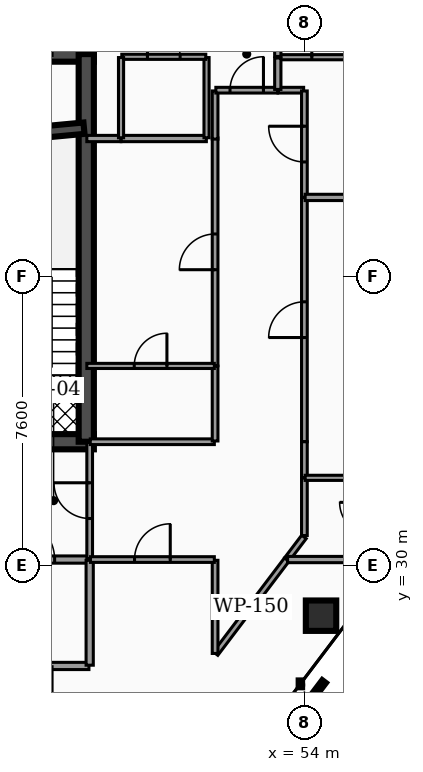
"""IFC4 building model, lengths in metres.
Left out: names, types, materials, properties, quantities, classifications, styles, units other than length and angle.
Written with IfcOpenShell. Run it as: python <this file> out.ifc"""

import sys

from ifc_helpers import new_model, si_unit, direction, frame, frame_2d, origin, origin_2d, place, context, subcontext, project, spatial, rectangle, hollow_rectangle, extrude, element, fill, save


model = new_model("IFC4")
c1 = context("Model", 3, precision=1e-05, world=origin(), true_north=direction((0.0, 1.0)))
c2 = subcontext(c1, "Body", "Model", "MODEL_VIEW")
j1 = project(units=[si_unit("LENGTHUNIT", "METRE"), si_unit("PLANEANGLEUNIT", "RADIAN")], contexts=[c1])
p1 = place(None, origin())
s1 = spatial("IfcSite", under=j1, at=p1, CompositionType="ELEMENT")
p2 = place(p1, origin())
s2 = spatial("IfcBuilding", under=s1, at=p2, CompositionType="ELEMENT")
p3 = place(p2, frame((0.0, 0.0, 127.16)))
s3 = spatial("IfcBuildingStorey", under=s2, at=p3, CompositionType="ELEMENT", Elevation=127.16)
p4 = place(p3, frame((28.4, 43.45, 0.0), z_axis=(0.0, 0.0, 1.0), x_axis=(1.0, 0.0, 0.0)))
e1 = element("IfcWall", 1, at=p4, inside=s3, PredefinedType="SHEAR", context=c2, shape_type="SweptSolid", body=[
    extrude(rectangle(XDim=20.06, YDim=0.4, at=frame_2d((10.03, 0.0))), origin(), (0.0, 0.0, 1.0), 3.5),
])
p5 = place(p3, frame((28.4, 33.25, 0.0), z_axis=(0.0, 0.0, 1.0), x_axis=(1.0, 0.0, 0.0)))
e2 = element("IfcWall", 2, at=p5, inside=s3, PredefinedType="SHEAR", context=c2, shape_type="SweptSolid", body=[
    extrude(rectangle(XDim=20.06, YDim=0.4, at=frame_2d((10.03, 0.0))), origin(), (0.0, 0.0, 1.0), 3.5),
])
p6 = place(p5, frame((4.03, 0.0, 0.0)))
e3 = element("IfcOpeningElement", 3, at=p6, cuts=e2, PredefinedType="OPENING", context=c2, shape_type="SweptSolid", body=[
    extrude(rectangle(XDim=1.1, YDim=2.15, at=frame_2d((0.55, 1.075))), frame((0.0, 0.21, 0.0), z_axis=(0.0, -1.0, 0.0), x_axis=(1.0, 0.0, 0.0)), (0.0, 0.0, 1.0), 0.42),
])
p7 = place(p5, frame((14.87, 0.0, 0.0)))
e4 = element("IfcOpeningElement", 4, at=p7, cuts=e2, PredefinedType="OPENING", context=c2, shape_type="SweptSolid", body=[
    extrude(rectangle(XDim=1.1, YDim=2.15, at=frame_2d((0.55, 1.075))), frame((0.0, 0.21, 0.0), z_axis=(0.0, -1.0, 0.0), x_axis=(1.0, 0.0, 0.0)), (0.0, 0.0, 1.0), 0.42),
])
p8 = place(p5, frame((5.95, 0.0, 0.0)))
e5 = element("IfcOpeningElement", 5, at=p8, cuts=e2, PredefinedType="OPENING", context=c2, shape_type="SweptSolid", body=[
    extrude(rectangle(XDim=1.0, YDim=2.1, at=frame_2d((0.5, 1.05))), frame((0.0, 0.21, 0.0), z_axis=(0.0, -1.0, 0.0), x_axis=(1.0, 0.0, 0.0)), (0.0, 0.0, 1.0), 0.42),
])
p9 = place(p5, frame((7.65, 0.0, 0.0)))
e6 = element("IfcOpeningElement", 6, at=p9, cuts=e2, PredefinedType="OPENING", context=c2, shape_type="SweptSolid", body=[
    extrude(rectangle(XDim=1.0, YDim=2.1, at=frame_2d((0.5, 1.05))), frame((0.0, 0.21, 0.0), z_axis=(0.0, -1.0, 0.0), x_axis=(1.0, 0.0, 0.0)), (0.0, 0.0, 1.0), 0.42),
])
p10 = place(p5, frame((1.31, 0.0, 0.0)))
e7 = element("IfcOpeningElement", 7, at=p10, cuts=e2, PredefinedType="OPENING", context=c2, shape_type="SweptSolid", body=[
    extrude(rectangle(XDim=1.1, YDim=2.2, at=frame_2d((0.55, 1.1))), frame((0.0, 0.21, 0.0), z_axis=(0.0, -1.0, 0.0), x_axis=(1.0, 0.0, 0.0)), (0.0, 0.0, 1.0), 0.42),
])
p11 = place(p5, frame((9.44, 0.0, 0.0)))
e8 = element("IfcOpeningElement", 8, at=p11, cuts=e2, PredefinedType="OPENING", context=c2, shape_type="SweptSolid", body=[
    extrude(rectangle(XDim=1.12, YDim=2.05, at=frame_2d((0.56, 1.025))), frame((0.0, 0.21, 0.0), z_axis=(0.0, -1.0, 0.0), x_axis=(1.0, 0.0, 0.0)), (0.0, 0.0, 1.0), 0.42),
])
p12 = place(p5, frame((17.65, 0.0, 0.0)))
e9 = element("IfcOpeningElement", 9, at=p12, cuts=e2, PredefinedType="OPENING", context=c2, shape_type="SweptSolid", body=[
    extrude(rectangle(XDim=1.1, YDim=2.2, at=frame_2d((0.55, 1.1))), frame((0.0, 0.21, 0.0), z_axis=(0.0, -1.0, 0.0), x_axis=(1.0, 0.0, 0.0)), (0.0, 0.0, 1.0), 0.42),
])
p13 = place(p3, frame((48.26, 33.25, 0.0), z_axis=(0.0, 0.0, 1.0), x_axis=(0.0, 1.0, 0.0)))
e10 = element("IfcWall", 10, at=p13, inside=s3, PredefinedType="SHEAR", context=c2, shape_type="SweptSolid", body=[
    extrude(rectangle(XDim=10.2, YDim=0.4, at=frame_2d((5.1, 0.0))), origin(), (0.0, 0.0, 1.0), 3.5),
])
p14 = place(p3, frame((44.98, 41.2, 0.0), z_axis=(0.0, 0.0, 1.0), x_axis=(0.995686468965, 0.09278176286, 0.0)))
e11 = element("IfcWall", 11, at=p14, inside=s3, PredefinedType="SHEAR", context=c2, shape_type="SweptSolid", body=[
    extrude(rectangle(XDim=3.234, YDim=0.3, at=frame_2d((1.617, 0.0))), origin(), (0.0, 0.0, 1.0), 3.5),
])
p15 = place(p3, frame((54.438, 28.673, 0.0), z_axis=(0.0, 0.0, 1.0), x_axis=(1.0, 0.0, 0.0)))
e12 = element("IfcColumn", 12, at=p15, inside=s3, PredefinedType="COLUMN", context=c2, shape_type="SweptSolid", body=[
    extrude(hollow_rectangle(XDim=0.8, YDim=0.8, WallThickness=0.04, at=origin_2d()), origin(), (0.0, 0.0, 1.0), 3.5),
])
p16 = place(p3, frame((45.405, 30.15, 0.0), z_axis=(0.0, 0.0, 1.0), x_axis=(1.0, 0.0, 0.0)))
e13 = element("IfcWall", 13, at=p16, inside=s3, PredefinedType="PARTITIONING", context=c2, shape_type="SweptSolid", body=[
    extrude(rectangle(XDim=2.925, YDim=0.19, at=frame_2d((1.462, 0.0))), origin(), (0.0, 0.0, 1.0), 2.457),
])
p17 = place(p16, frame((0.903, 0.0, 0.0)))
e14 = element("IfcOpeningElement", 14, at=p17, cuts=e13, PredefinedType="OPENING", context=c2, shape_type="SweptSolid", body=[
    extrude(rectangle(XDim=1.12, YDim=2.05, at=frame_2d((0.56, 1.025))), frame((0.0, 0.105, 0.0), z_axis=(0.0, -1.0, 0.0), x_axis=(1.0, 0.0, 0.0)), (0.0, 0.0, 1.0), 0.21),
])
p18 = place(p3, frame((48.35, 30.17, 0.0), z_axis=(0.0, 0.0, 1.0), x_axis=(0.0, 1.0, 0.0)))
e15 = element("IfcWall", 15, at=p18, inside=s3, PredefinedType="PARTITIONING", context=c2, shape_type="SweptSolid", body=[
    extrude(rectangle(XDim=3.06, YDim=0.15, at=frame_2d((1.53, 0.0))), origin(), (0.0, 0.0, 1.0), 2.457),
])
p19 = place(p18, frame((1.06, 0.0, 0.0)))
e16 = element("IfcOpeningElement", 16, at=p19, cuts=e15, PredefinedType="OPENING", context=c2, shape_type="SweptSolid", body=[
    extrude(rectangle(XDim=0.94, YDim=2.05, at=frame_2d((0.47, 1.025))), frame((0.0, 0.085, 0.0), z_axis=(0.0, -1.0, 0.0), x_axis=(1.0, 0.0, 0.0)), (0.0, 0.0, 1.0), 0.17),
])
p20 = place(p3, frame((47.305, 27.35, 0.0), z_axis=(0.0, 0.0, 1.0), x_axis=(1.0, 0.0, 0.0)))
e17 = element("IfcWall", 17, at=p20, inside=s3, PredefinedType="PARTITIONING", context=c2, shape_type="SweptSolid", body=[
    extrude(rectangle(XDim=1.025, YDim=0.19, at=frame_2d((0.513, 0.0))), origin(), (0.0, 0.0, 1.0), 2.457),
])
p21 = place(p3, frame((48.35, 27.37, 0.0), z_axis=(0.0, 0.0, 1.0), x_axis=(0.0, 1.0, 0.0)))
e18 = element("IfcWall", 18, at=p21, inside=s3, PredefinedType="PARTITIONING", context=c2, shape_type="SweptSolid", body=[
    extrude(rectangle(XDim=2.76, YDim=0.19, at=frame_2d((1.38, 0.0))), origin(), (0.0, 0.0, 1.0), 2.457),
])
p22 = place(p3, frame((51.662, 27.675, 0.0), z_axis=(0.0, 0.0, 1.0), x_axis=(0.603831940294, 0.797111653334, 0.0)))
e19 = element("IfcWall", 19, at=p22, inside=s3, PredefinedType="PARTITIONING", context=c2, shape_type="SweptSolid", body=[
    extrude(rectangle(XDim=3.104, YDim=0.15, at=frame_2d((1.552, 0.0))), origin(), (0.0, 0.0, 1.0), 2.457),
])
p23 = place(p3, frame((51.65, 27.679, 0.0), z_axis=(0.0, 0.0, 1.0), x_axis=(0.0, 1.0, 0.0)))
e20 = element("IfcWall", 20, at=p23, inside=s3, PredefinedType="PARTITIONING", context=c2, shape_type="SweptSolid", body=[
    extrude(rectangle(XDim=2.451, YDim=0.15, at=frame_2d((1.225, 0.0))), origin(), (0.0, 0.0, 1.0), 2.457),
])
p24 = place(p3, frame((48.37, 30.15, 0.0), z_axis=(0.0, 0.0, 1.0), x_axis=(1.0, 0.0, 0.0)))
e21 = element("IfcWall", 21, at=p24, inside=s3, PredefinedType="PARTITIONING", context=c2, shape_type="SweptSolid", body=[
    extrude(rectangle(XDim=3.26, YDim=0.15, at=frame_2d((1.63, 0.0))), origin(), (0.0, 0.0, 1.0), 2.457),
])
p25 = place(p24, frame((1.16, 0.0, 0.0)))
e22 = element("IfcOpeningElement", 22, at=p25, cuts=e21, PredefinedType="OPENING", context=c2, shape_type="SweptSolid", body=[
    extrude(rectangle(XDim=0.94, YDim=2.05, at=frame_2d((0.47, 1.025))), frame((0.0, 0.085, 0.0), z_axis=(0.0, -1.0, 0.0), x_axis=(1.0, 0.0, 0.0)), (0.0, 0.0, 1.0), 0.17),
])
p26 = place(p3, frame((54.0, 33.25, 0.0), z_axis=(0.0, 0.0, 1.0), x_axis=(0.0, 1.0, 0.0)))
e23 = element("IfcWall", 23, at=p26, inside=s3, PredefinedType="PARTITIONING", context=c2, shape_type="SweptSolid", body=[
    extrude(rectangle(XDim=6.423, YDim=0.15, at=frame_2d((3.212, 0.0))), origin(), (0.0, 0.0, 1.0), 2.457),
])
p27 = place(p26, frame((2.742, 0.0, 0.0)))
e24 = element("IfcOpeningElement", 24, at=p27, cuts=e23, PredefinedType="OPENING", context=c2, shape_type="SweptSolid", body=[
    extrude(rectangle(XDim=0.94, YDim=2.05, at=frame_2d((0.47, 1.025))), frame((0.0, 0.085, 0.0), z_axis=(0.0, -1.0, 0.0), x_axis=(1.0, 0.0, 0.0)), (0.0, 0.0, 1.0), 0.17),
])
p28 = place(p3, frame((54.0, 32.305, 0.0), z_axis=(0.0, 0.0, 1.0), x_axis=(0.0, 1.0, 0.0)))
e25 = element("IfcWall", 25, at=p28, inside=s3, PredefinedType="PARTITIONING", context=c2, shape_type="SweptSolid", body=[
    extrude(rectangle(XDim=0.945, YDim=0.15, at=frame_2d((0.473, 0.0))), origin(), (0.0, 0.0, 1.0), 2.457),
])
p29 = place(p3, frame((54.0, 30.781, 0.0), z_axis=(0.0, 0.0, 1.0), x_axis=(0.0, 1.0, 0.0)))
e26 = element("IfcWall", 26, at=p29, inside=s3, PredefinedType="PARTITIONING", context=c2, shape_type="SweptSolid", body=[
    extrude(rectangle(XDim=1.514, YDim=0.15, at=frame_2d((0.757, 0.0))), origin(), (0.0, 0.0, 1.0), 2.457),
])
p30 = place(p3, frame((53.54, 30.154, 0.0), z_axis=(0.0, 0.0, 1.0), x_axis=(0.603680225987, 0.797226557982, 0.0)))
e27 = element("IfcWall", 27, at=p30, inside=s3, PredefinedType="PARTITIONING", context=c2, shape_type="SweptSolid", body=[
    extrude(rectangle(XDim=0.742, YDim=0.15, at=frame_2d((0.371, 0.0))), origin(), (0.0, 0.0, 1.0), 2.457),
])
p31 = place(p3, frame((53.305, 42.5, 0.0), z_axis=(0.0, 0.0, 1.0), x_axis=(1.0, 0.0, 0.0)))
e28 = element("IfcWall", 28, at=p31, inside=s3, PredefinedType="PARTITIONING", context=c2, shape_type="SweptSolid", body=[
    extrude(rectangle(XDim=0.675, YDim=0.15, at=frame_2d((0.337, 0.0))), origin(), (0.0, 0.0, 1.0), 2.457),
])
p32 = place(p3, frame((54.0, 39.683, 0.0), z_axis=(0.0, 0.0, 1.0), x_axis=(0.0, 1.0, 0.0)))
e29 = element("IfcWall", 29, at=p32, inside=s3, PredefinedType="PARTITIONING", context=c2, shape_type="SweptSolid", body=[
    extrude(rectangle(XDim=2.797, YDim=0.15, at=frame_2d((1.398, 0.0))), origin(), (0.0, 0.0, 1.0), 2.457),
])
p33 = place(p32, frame((0.928, 0.0, 0.0)))
e30 = element("IfcOpeningElement", 30, at=p33, cuts=e29, PredefinedType="OPENING", context=c2, shape_type="SweptSolid", body=[
    extrude(rectangle(XDim=0.94, YDim=2.05, at=frame_2d((0.47, 1.025))), frame((0.0, 0.085, 0.0), z_axis=(0.0, -1.0, 0.0), x_axis=(1.0, 0.0, 0.0)), (0.0, 0.0, 1.0), 0.17),
])
p34 = place(p3, frame((51.65, 35.25, 0.0), z_axis=(0.0, 0.0, 1.0), x_axis=(0.0, 1.0, 0.0)))
e31 = element("IfcWall", 31, at=p34, inside=s3, PredefinedType="PARTITIONING", context=c2, shape_type="SweptSolid", body=[
    extrude(rectangle(XDim=5.994, YDim=0.15, at=frame_2d((2.997, 0.0))), origin(), (0.0, 0.0, 1.0), 2.457),
])
p35 = place(p34, frame((2.527, 0.0, 0.0)))
e32 = element("IfcOpeningElement", 32, at=p35, cuts=e31, PredefinedType="OPENING", context=c2, shape_type="SweptSolid", body=[
    extrude(rectangle(XDim=0.94, YDim=2.05, at=frame_2d((0.47, 1.025))), frame((0.0, 0.085, 0.0), z_axis=(0.0, -1.0, 0.0), x_axis=(1.0, 0.0, 0.0)), (0.0, 0.0, 1.0), 0.17),
])
p36 = place(p3, frame((48.365, 33.25, 0.0), z_axis=(0.0, 0.0, 1.0), x_axis=(1.0, 0.0, 0.0)))
e33 = element("IfcWall", 33, at=p36, inside=s3, PredefinedType="PARTITIONING", context=c2, shape_type="SweptSolid", body=[
    extrude(rectangle(XDim=3.265, YDim=0.15, at=frame_2d((1.632, 0.0))), origin(), (0.0, 0.0, 1.0), 2.457),
])
p37 = place(p3, frame((51.65, 33.27, 0.0), z_axis=(0.0, 0.0, 1.0), x_axis=(0.0, 1.0, 0.0)))
e34 = element("IfcWall", 34, at=p37, inside=s3, PredefinedType="PARTITIONING", context=c2, shape_type="SweptSolid", body=[
    extrude(rectangle(XDim=1.969, YDim=0.15, at=frame_2d((0.985, 0.0))), origin(), (0.0, 0.0, 1.0), 2.457),
])
p38 = place(p3, frame((51.65, 41.213, 0.0), z_axis=(0.0, 0.0, 1.0), x_axis=(0.0, 1.0, 0.0)))
e35 = element("IfcWall", 35, at=p38, inside=s3, PredefinedType="PARTITIONING", context=c2, shape_type="SweptSolid", body=[
    extrude(rectangle(XDim=1.267, YDim=0.15, at=frame_2d((0.633, 0.0))), origin(), (0.0, 0.0, 1.0), 2.457),
])
p39 = place(p3, frame((51.67, 42.5, 0.0), z_axis=(0.0, 0.0, 1.0), x_axis=(1.0, 0.0, 0.0)))
e36 = element("IfcWall", 36, at=p39, inside=s3, PredefinedType="PARTITIONING", context=c2, shape_type="SweptSolid", body=[
    extrude(rectangle(XDim=1.625, YDim=0.15, at=frame_2d((0.812, 0.0))), origin(), (0.0, 0.0, 1.0), 2.457),
])
p40 = place(p39, frame((0.373, 0.0, 0.0)))
e37 = element("IfcOpeningElement", 37, at=p40, cuts=e36, PredefinedType="OPENING", context=c2, shape_type="SweptSolid", body=[
    extrude(rectangle(XDim=0.88, YDim=2.05, at=frame_2d((0.44, 1.025))), frame((0.0, 0.085, 0.0), z_axis=(0.0, -1.0, 0.0), x_axis=(1.0, 0.0, 0.0)), (0.0, 0.0, 1.0), 0.17),
])
p41 = place(p3, frame((47.3, 25.292, 0.0), z_axis=(0.0, 0.0, 1.0), x_axis=(0.0, 1.0, 0.0)))
e38 = element("IfcWall", 38, at=p41, inside=s3, PredefinedType="PARTITIONING", context=c2, shape_type="SweptSolid", body=[
    extrude(rectangle(XDim=2.038, YDim=0.12, at=frame_2d((1.019, 0.0))), origin(), (0.0, 0.0, 1.0), 2.457),
])
p42 = place(p3, frame((47.3, 43.415, 0.0), z_axis=(0.0, 0.0, 1.0), x_axis=(0.0, 1.0, 0.0)))
e39 = element("IfcWall", 39, at=p42, inside=s3, PredefinedType="PARTITIONING", context=c2, shape_type="SweptSolid", body=[
    extrude(rectangle(XDim=5.837, YDim=0.12, at=frame_2d((2.918, 0.0))), origin(), (0.0, 0.0, 1.0), 2.457),
])
p43 = place(p3, frame((53.557, 30.15, 0.0), z_axis=(0.0, 0.0, 1.0), x_axis=(1.0, 0.0, 0.0)))
e40 = element("IfcWall", 40, at=p43, inside=s3, PredefinedType="PARTITIONING", context=c2, shape_type="SweptSolid", body=[
    extrude(rectangle(XDim=2.225, YDim=0.165, at=frame_2d((1.113, 0.0))), origin(), (0.0, 0.0, 1.0), 2.457),
])
p44 = place(p3, frame((54.02, 32.3, 0.0), z_axis=(0.0, 0.0, 1.0), x_axis=(1.0, 0.0, 0.0)))
e41 = element("IfcWall", 41, at=p44, inside=s3, PredefinedType="PARTITIONING", context=c2, shape_type="SweptSolid", body=[
    extrude(rectangle(XDim=1.747, YDim=0.135, at=frame_2d((0.874, 0.0))), origin(), (0.0, 0.0, 1.0), 2.457),
])
p45 = place(p3, frame((54.02, 39.678, 0.0), z_axis=(0.0, 0.0, 1.0), x_axis=(1.0, 0.0, 0.0)))
e42 = element("IfcWall", 42, at=p45, inside=s3, PredefinedType="PARTITIONING", context=c2, shape_type="SweptSolid", body=[
    extrude(rectangle(XDim=7.967, YDim=0.165, at=frame_2d((3.983, 0.0))), origin(), (0.0, 0.0, 1.0), 2.457),
])
p46 = place(p3, frame((53.32, 43.367, 0.0), z_axis=(0.0, 0.0, 1.0), x_axis=(1.0, 0.0, 0.0)))
e43 = element("IfcWall", 43, at=p46, inside=s3, PredefinedType="PARTITIONING", context=c2, shape_type="SweptSolid", body=[
    extrude(rectangle(XDim=2.21, YDim=0.135, at=frame_2d((1.105, 0.0))), origin(), (0.0, 0.0, 1.0), 2.457),
])
p47 = place(p46, frame((0.875, 0.0, 0.0)))
e44 = element("IfcOpeningElement", 44, at=p47, cuts=e43, PredefinedType="OPENING", context=c2, shape_type="SweptSolid", body=[
    extrude(rectangle(XDim=0.86, YDim=2.05, at=frame_2d((0.43, 1.025))), frame((0.0, 0.077, 0.0), z_axis=(0.0, -1.0, 0.0), x_axis=(1.0, 0.0, 0.0)), (0.0, 0.0, 1.0), 0.155),
])
p48 = place(p3, frame((53.3, 42.52, 0.0), z_axis=(0.0, 0.0, 1.0), x_axis=(0.0, 1.0, 0.0)))
e45 = element("IfcWall", 45, at=p48, inside=s3, PredefinedType="PARTITIONING", context=c2, shape_type="SweptSolid", body=[
    extrude(rectangle(XDim=0.827, YDim=0.165, at=frame_2d((0.414, 0.0))), origin(), (0.0, 0.0, 1.0), 2.457),
])
p49 = place(p3, frame((53.3, 43.387, 0.0), z_axis=(0.0, 0.0, 1.0), x_axis=(0.0, 1.0, 0.0)))
e46 = element("IfcWall", 46, at=p49, inside=s3, PredefinedType="PARTITIONING", context=c2, shape_type="SweptSolid", body=[
    extrude(rectangle(XDim=2.11, YDim=0.165, at=frame_2d((1.055, 0.0))), origin(), (0.0, 0.0, 1.0), 2.457),
])
p50 = place(p3, frame((48.275, 35.245, 0.0), z_axis=(0.0, 0.0, 1.0), x_axis=(1.0, 0.0, 0.0)))
e47 = element("IfcWall", 47, at=p50, inside=s3, PredefinedType="PARTITIONING", context=c2, shape_type="SweptSolid", body=[
    extrude(rectangle(XDim=3.355, YDim=0.135, at=frame_2d((1.677, 0.0))), origin(), (0.0, 0.0, 1.0), 2.457),
])
p51 = place(p50, frame((1.248, 0.0, 0.0)))
e48 = element("IfcOpeningElement", 48, at=p51, cuts=e47, PredefinedType="OPENING", context=c2, shape_type="SweptSolid", body=[
    extrude(rectangle(XDim=0.86, YDim=2.05, at=frame_2d((0.43, 1.025))), frame((0.0, 0.077, 0.0), z_axis=(0.0, -1.0, 0.0), x_axis=(1.0, 0.0, 0.0)), (0.0, 0.0, 1.0), 0.155),
])
p52 = place(p3, frame((48.275, 41.228, 0.0), z_axis=(0.0, 0.0, 1.0), x_axis=(1.0, 0.0, 0.0)))
e49 = element("IfcWall", 49, at=p52, inside=s3, PredefinedType="PARTITIONING", context=c2, shape_type="SweptSolid", body=[
    extrude(rectangle(XDim=0.895, YDim=0.165, at=frame_2d((0.448, 0.0))), origin(), (0.0, 0.0, 1.0), 2.457),
])
p53 = place(p3, frame((49.18, 41.228, 0.0), z_axis=(0.0, 0.0, 1.0), x_axis=(1.0, 0.0, 0.0)))
e50 = element("IfcWall", 50, at=p53, inside=s3, PredefinedType="PARTITIONING", context=c2, shape_type="SweptSolid", body=[
    extrude(rectangle(XDim=2.24, YDim=0.165, at=frame_2d((1.12, 0.0))), origin(), (0.0, 0.0, 1.0), 2.457),
])
p54 = place(p3, frame((51.425, 41.248, 0.0), z_axis=(0.0, 0.0, 1.0), x_axis=(0.0, 1.0, 0.0)))
e51 = element("IfcWall", 51, at=p54, inside=s3, PredefinedType="PARTITIONING", context=c2, shape_type="SweptSolid", body=[
    extrude(rectangle(XDim=2.11, YDim=0.135, at=frame_2d((1.055, 0.0))), origin(), (0.0, 0.0, 1.0), 2.457),
])
p55 = place(p3, frame((49.195, 43.378, 0.0), z_axis=(0.0, 0.0, 1.0), x_axis=(1.0, 0.0, 0.0)))
e52 = element("IfcWall", 52, at=p55, inside=s3, PredefinedType="PARTITIONING", context=c2, shape_type="SweptSolid", body=[
    extrude(rectangle(XDim=2.21, YDim=0.135, at=frame_2d((1.105, 0.0))), origin(), (0.0, 0.0, 1.0), 2.457),
])
p56 = place(p55, frame((0.675, 0.0, 0.0)))
e53 = element("IfcOpeningElement", 53, at=p56, cuts=e52, PredefinedType="OPENING", context=c2, shape_type="SweptSolid", body=[
    extrude(rectangle(XDim=0.86, YDim=2.05, at=frame_2d((0.43, 1.025))), frame((0.0, 0.077, 0.0), z_axis=(0.0, -1.0, 0.0), x_axis=(1.0, 0.0, 0.0)), (0.0, 0.0, 1.0), 0.155),
])
p57 = place(p3, frame((49.175, 41.248, 0.0), z_axis=(0.0, 0.0, 1.0), x_axis=(0.0, 1.0, 0.0)))
e54 = element("IfcWall", 54, at=p57, inside=s3, PredefinedType="PARTITIONING", context=c2, shape_type="SweptSolid", body=[
    extrude(rectangle(XDim=2.11, YDim=0.135, at=frame_2d((1.055, 0.0))), origin(), (0.0, 0.0, 1.0), 2.457),
])
p58 = place(p17, origin())
e55 = element("IfcDoor", 55, at=p58, inside=s3, OperationType="SINGLE_SWING_LEFT", PredefinedType="DOOR", context=c2, shape_type="SweptSolid", body=[
    extrude(rectangle(XDim=1.12, YDim=2.05, at=frame_2d((0.56, 1.025))), frame((0.0, 0.025, 0.0), z_axis=(0.0, -1.0, 0.0), x_axis=(1.0, 0.0, 0.0)), (0.0, 0.0, 1.0), 0.05),
])
fill(e14, e55)
p59 = place(p19, origin())
e56 = element("IfcDoor", 56, at=p59, inside=s3, OperationType="SINGLE_SWING_RIGHT", PredefinedType="DOOR", context=c2, shape_type="SweptSolid", body=[
    extrude(rectangle(XDim=0.94, YDim=2.05, at=frame_2d((0.47, 1.025))), frame((0.0, 0.025, 0.0), z_axis=(0.0, -1.0, 0.0), x_axis=(1.0, 0.0, 0.0)), (0.0, 0.0, 1.0), 0.05),
])
fill(e16, e56)
p60 = place(p25, origin())
e57 = element("IfcDoor", 57, at=p60, inside=s3, OperationType="SINGLE_SWING_RIGHT", PredefinedType="DOOR", context=c2, shape_type="SweptSolid", body=[
    extrude(rectangle(XDim=0.94, YDim=2.05, at=frame_2d((0.47, 1.025))), frame((0.0, 0.025, 0.0), z_axis=(0.0, -1.0, 0.0), x_axis=(1.0, 0.0, 0.0)), (0.0, 0.0, 1.0), 0.05),
])
fill(e22, e57)
p61 = place(p27, origin())
e58 = element("IfcDoor", 58, at=p61, inside=s3, OperationType="SINGLE_SWING_LEFT", PredefinedType="DOOR", context=c2, shape_type="SweptSolid", body=[
    extrude(rectangle(XDim=0.94, YDim=2.05, at=frame_2d((0.47, 1.025))), frame((0.0, 0.025, 0.0), z_axis=(0.0, -1.0, 0.0), x_axis=(1.0, 0.0, 0.0)), (0.0, 0.0, 1.0), 0.05),
])
fill(e24, e58)
p62 = place(p33, origin())
e59 = element("IfcDoor", 59, at=p62, inside=s3, OperationType="SINGLE_SWING_RIGHT", PredefinedType="DOOR", context=c2, shape_type="SweptSolid", body=[
    extrude(rectangle(XDim=0.94, YDim=2.05, at=frame_2d((0.47, 1.025))), frame((0.0, 0.025, 0.0), z_axis=(0.0, -1.0, 0.0), x_axis=(1.0, 0.0, 0.0)), (0.0, 0.0, 1.0), 0.05),
])
fill(e30, e59)
p63 = place(p35, origin())
e60 = element("IfcDoor", 60, at=p63, inside=s3, OperationType="SINGLE_SWING_LEFT", PredefinedType="DOOR", context=c2, shape_type="SweptSolid", body=[
    extrude(rectangle(XDim=0.94, YDim=2.05, at=frame_2d((0.47, 1.025))), frame((0.0, 0.025, 0.0), z_axis=(0.0, -1.0, 0.0), x_axis=(1.0, 0.0, 0.0)), (0.0, 0.0, 1.0), 0.05),
])
fill(e32, e60)
p64 = place(p40, origin())
e61 = element("IfcDoor", 61, at=p64, inside=s3, OperationType="SINGLE_SWING_RIGHT", PredefinedType="DOOR", context=c2, shape_type="SweptSolid", body=[
    extrude(rectangle(XDim=0.88, YDim=2.05, at=frame_2d((0.44, 1.025))), frame((0.0, 0.025, 0.0), z_axis=(0.0, -1.0, 0.0), x_axis=(1.0, 0.0, 0.0)), (0.0, 0.0, 1.0), 0.05),
])
fill(e37, e61)
p65 = place(p47, origin())
e62 = element("IfcDoor", 62, at=p65, inside=s3, OperationType="SINGLE_SWING_LEFT", PredefinedType="DOOR", context=c2, shape_type="SweptSolid", body=[
    extrude(rectangle(XDim=0.86, YDim=2.05, at=frame_2d((0.43, 1.025))), frame((0.0, 0.025, 0.0), z_axis=(0.0, -1.0, 0.0), x_axis=(1.0, 0.0, 0.0)), (0.0, 0.0, 1.0), 0.05),
])
fill(e44, e62)
p66 = place(p51, origin())
e63 = element("IfcDoor", 63, at=p66, inside=s3, OperationType="SINGLE_SWING_RIGHT", PredefinedType="DOOR", context=c2, shape_type="SweptSolid", body=[
    extrude(rectangle(XDim=0.86, YDim=2.05, at=frame_2d((0.43, 1.025))), frame((0.0, 0.025, 0.0), z_axis=(0.0, -1.0, 0.0), x_axis=(1.0, 0.0, 0.0)), (0.0, 0.0, 1.0), 0.05),
])
fill(e48, e63)
p67 = place(p56, origin())
e64 = element("IfcDoor", 64, at=p67, inside=s3, OperationType="SINGLE_SWING_LEFT", PredefinedType="DOOR", context=c2, shape_type="SweptSolid", body=[
    extrude(rectangle(XDim=0.86, YDim=2.05, at=frame_2d((0.43, 1.025))), frame((0.0, 0.025, 0.0), z_axis=(0.0, -1.0, 0.0), x_axis=(1.0, 0.0, 0.0)), (0.0, 0.0, 1.0), 0.05),
])
fill(e53, e64)
save(model, sys.argv[1])
